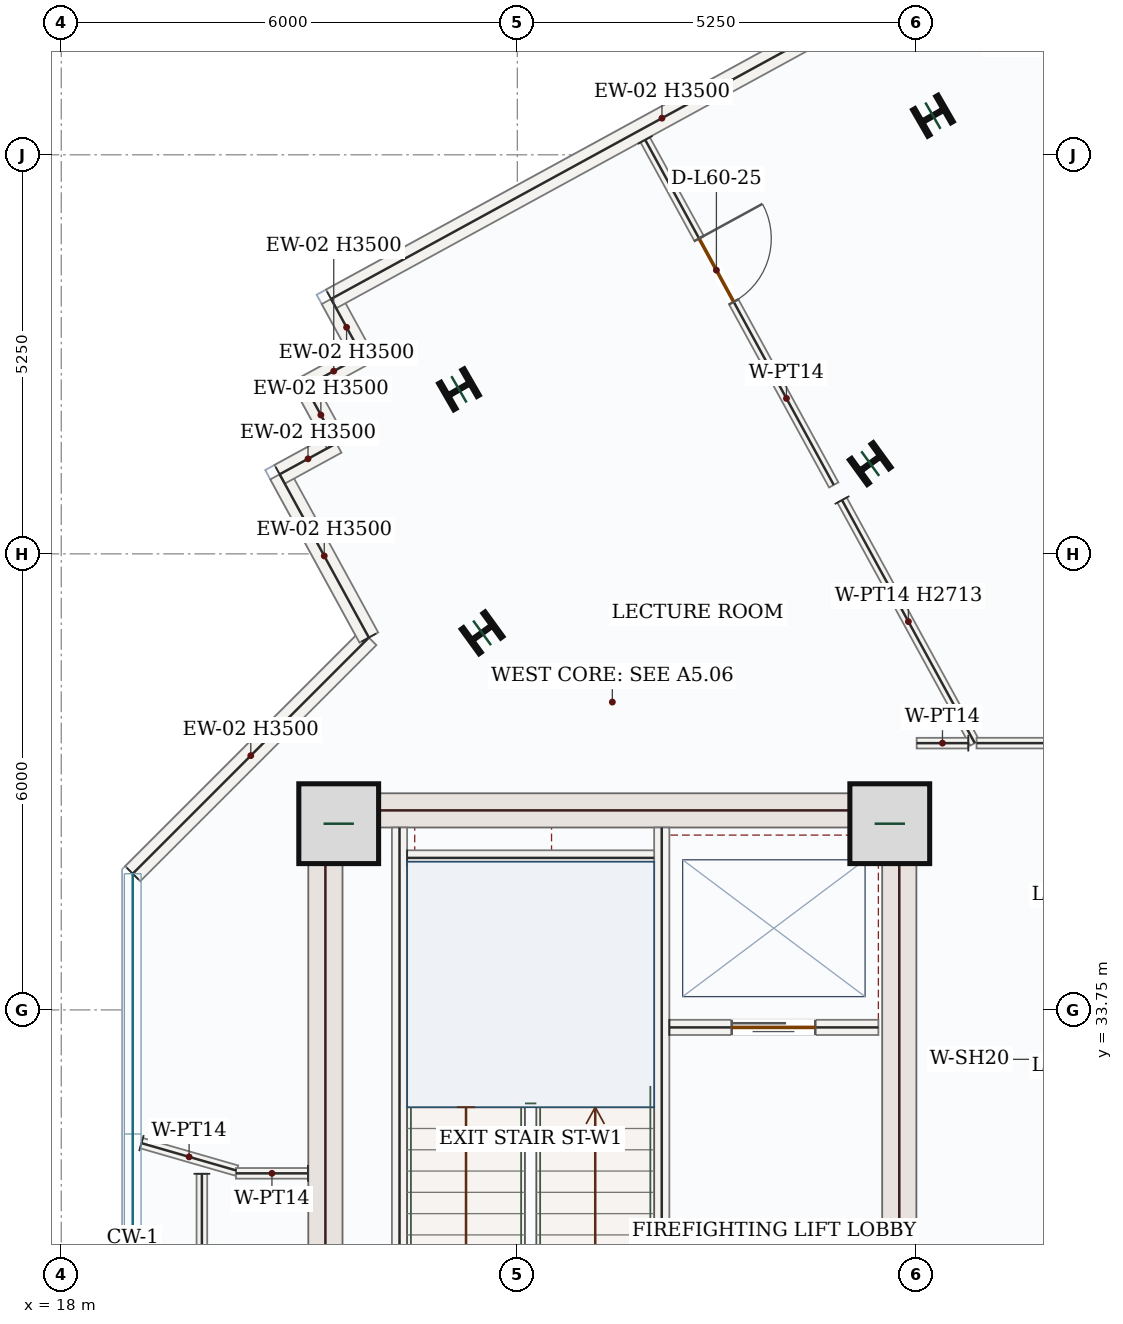
"""IFC4 building model, lengths in metres.
Left out: names, types, materials, properties, quantities, classifications, styles, units other than length and angle.
Written with IfcOpenShell. Run it as: python <this file> out.ifc"""

import sys

from ifc_helpers import new_model, si_unit, direction, frame, frame_2d, origin, origin_2d, place, context, subcontext, project, spatial, rectangle, i_section, extrude, source, transform, mapped, element, fill, save


model = new_model("IFC4")
c1 = context("Model", 3, precision=1e-05, world=origin(), true_north=direction((0.0, 1.0)))
c2 = subcontext(c1, "Body", "Model", "MODEL_VIEW")
j1 = project(units=[si_unit("LENGTHUNIT", "METRE"), si_unit("PLANEANGLEUNIT", "RADIAN")], contexts=[c1])
p1 = place(None, origin())
s1 = spatial("IfcSite", under=j1, at=p1, CompositionType="ELEMENT")
p2 = place(p1, origin())
s2 = spatial("IfcBuilding", under=s1, at=p2, CompositionType="ELEMENT")
p3 = place(p2, frame((0.0, 0.0, 254.1)))
s3 = spatial("IfcBuildingStorey", under=s2, at=p3, CompositionType="ELEMENT", Elevation=254.1)
m1 = source(origin(), c2, "Body", "SweptSolid", [
    extrude(rectangle(XDim=8.55, YDim=0.45, at=frame_2d((4.275, 0.0))), origin(), (0.0, 0.0, 1.0), 3.5),
])
p4 = place(p3, frame((21.475, 28.05, 0.0), z_axis=(0.0, 0.0, 1.0), x_axis=(0.0, 1.0, 0.0)))
e1 = element("IfcWall", 1, at=p4, inside=s3, PredefinedType="SHEAR", context=c2, shape_type="MappedRepresentation", body=[
    mapped(m1, transform((0.0, 0.0, 0.0), x_axis=(1.0, 0.0, 0.0), y_axis=(0.0, 1.0, 0.0), z_axis=(0.0, 0.0, 1.0), scale=1.0)),
])
p5 = place(p3, frame((29.025, 28.05, 0.0), z_axis=(0.0, 0.0, 1.0), x_axis=(0.0, 1.0, 0.0)))
e2 = element("IfcWall", 2, at=p5, inside=s3, PredefinedType="SHEAR", context=c2, shape_type="SweptSolid", body=[
    extrude(rectangle(XDim=8.55, YDim=0.45, at=frame_2d((4.275, 0.0))), origin(), (0.0, 0.0, 1.0), 3.5),
])
p6 = place(p5, frame((1.5, 0.0, 0.0)))
e3 = element("IfcOpeningElement", 3, at=p6, cuts=e2, PredefinedType="OPENING", context=c2, shape_type="SweptSolid", body=[
    extrude(rectangle(XDim=1.1, YDim=2.2, at=frame_2d((0.55, 1.1))), frame((0.0, 0.235, 0.0), z_axis=(0.0, -1.0, 0.0), x_axis=(1.0, 0.0, 0.0)), (0.0, 0.0, 1.0), 0.47),
])
m2 = source(origin(), c2, "Body", "SweptSolid", [
    extrude(rectangle(XDim=7.1, YDim=0.45, at=frame_2d((3.55, 0.0))), origin(), (0.0, 0.0, 1.0), 3.5),
])
p7 = place(p3, frame((21.7, 36.375, 0.0), z_axis=(0.0, 0.0, 1.0), x_axis=(1.0, 0.0, 0.0)))
e4 = element("IfcWall", 4, at=p7, inside=s3, PredefinedType="SHEAR", context=c2, shape_type="MappedRepresentation", body=[
    mapped(m2, transform((0.0, 0.0, 0.0), x_axis=(1.0, 0.0, 0.0), y_axis=(0.0, 1.0, 0.0), z_axis=(0.0, 0.0, 1.0), scale=1.0)),
])
m3 = source(origin(), c2, "Body", "SweptSolid", [
    extrude(rectangle(XDim=1.05, YDim=1.05, at=origin_2d()), origin(), (0.0, 0.0, 1.0), 3.75),
])
for number, where, z_axis, x_axis in (
    (5, (21.65, 36.2, 0.0), (0.0, 0.0, 1.0), (1.0, 0.0, 0.0)),
    (6, (28.9, 36.2, 0.0), (0.0, 0.0, 1.0), (1.0, 0.0, 0.0)),
):
    element("IfcColumn", number, at=place(p3, frame(where, z_axis=z_axis, x_axis=x_axis)), inside=s3, PredefinedType="COLUMN", context=c2, shape_type="MappedRepresentation", body=[
        mapped(m3, transform((0.0, 0.0, 0.0), x_axis=(1.0, 0.0, 0.0), y_axis=(0.0, 1.0, 0.0), z_axis=(0.0, 0.0, 1.0), scale=1.0)),
    ])
m4 = source(origin(), c2, "Body", "SweptSolid", [
    extrude(i_section(OverallWidth=0.399, OverallDepth=0.386, WebThickness=0.021, FlangeThickness=0.033, FilletRadius=0.018, at=origin_2d()), origin(), (0.0, 0.0, 1.0), 3.75),
])
for number, where, z_axis, x_axis in (
    (7, (28.643, 40.937, 0.0), (0.0, 0.0, 1.0), (-0.588, 0.809, 0.0)),
    (8, (23.536, 38.711, 0.0), (0.0, 0.0, 1.0), (-0.588, 0.809, 0.0)),
    (9, (29.468, 45.514, 0.0), (0.0, 0.0, 1.0), (-0.5, 0.866, 0.0)),
    (10, (23.232, 41.914, 0.0), (0.0, 0.0, 1.0), (-0.5, 0.866, 0.0)),
):
    element("IfcColumn", number, at=place(p3, frame(where, z_axis=z_axis, x_axis=x_axis)), inside=s3, PredefinedType="COLUMN", context=c2, shape_type="MappedRepresentation", body=[
        mapped(m4, transform((0.0, 0.0, 0.0), x_axis=(1.0, 0.0, 0.0), y_axis=(0.0, 1.0, 0.0), z_axis=(0.0, 0.0, 1.0), scale=1.0)),
    ])
m5 = source(origin(), c2, "Body", "SweptSolid", [
    extrude(rectangle(XDim=4.394, YDim=0.28, at=frame_2d((2.197, 0.0))), origin(), (0.0, 0.0, 1.0), 3.5),
])
p8 = place(p3, frame((18.94, 35.542, 0.0), z_axis=(0.0, 0.0, 1.0), x_axis=(0.707106781187, 0.707106781187, 0.0)))
e11 = element("IfcWall", 11, at=p8, inside=s3, PredefinedType="SOLIDWALL", context=c2, shape_type="MappedRepresentation", body=[
    mapped(m5, transform((0.0, 0.0, 0.0), x_axis=(1.0, 0.0, 0.0), y_axis=(0.0, 1.0, 0.0), z_axis=(0.0, 0.0, 1.0), scale=1.0)),
])
m6 = source(origin(), c2, "Body", "SweptSolid", [
    extrude(rectangle(XDim=2.448, YDim=0.28, at=frame_2d((1.224, 0.0))), origin(), (0.0, 0.0, 1.0), 3.5),
])
p9 = place(p3, frame((22.047, 38.649, 0.0), z_axis=(0.0, 0.0, 1.0), x_axis=(-0.47951595933, 0.877533158774, 0.0)))
e12 = element("IfcWall", 12, at=p9, inside=s3, PredefinedType="SOLIDWALL", context=c2, shape_type="MappedRepresentation", body=[
    mapped(m6, transform((0.0, 0.0, 0.0), x_axis=(1.0, 0.0, 0.0), y_axis=(0.0, 1.0, 0.0), z_axis=(0.0, 0.0, 1.0), scale=1.0)),
])
m7 = source(origin(), c2, "Body", "SweptSolid", [
    extrude(rectangle(XDim=0.85, YDim=0.28, at=frame_2d((0.425, 0.0))), origin(), (0.0, 0.0, 1.0), 3.5),
])
p10 = place(p3, frame((20.873, 40.796, 0.0), z_axis=(0.0, 0.0, 1.0), x_axis=(0.87752219781, 0.479536017782, 0.0)))
e13 = element("IfcWall", 13, at=p10, inside=s3, PredefinedType="SOLIDWALL", context=c2, shape_type="MappedRepresentation", body=[
    mapped(m7, transform((0.0, 0.0, 0.0), x_axis=(1.0, 0.0, 0.0), y_axis=(0.0, 1.0, 0.0), z_axis=(0.0, 0.0, 1.0), scale=1.0)),
])
m8 = source(origin(), c2, "Body", "SweptSolid", [
    extrude(rectangle(XDim=0.85, YDim=0.28, at=frame_2d((0.425, 0.0))), origin(), (0.0, 0.0, 1.0), 3.5),
])
for number, where, z_axis, x_axis in (
    (14, (21.619, 41.204, 0.0), (0.0, 0.0, 1.0), (-0.48, 0.877, 0.0)),
    (15, (21.211, 41.95, 0.0), (0.0, 0.0, 1.0), (0.878, 0.479, 0.0)),
):
    element("IfcWall", number, at=place(p3, frame(where, z_axis=z_axis, x_axis=x_axis)), inside=s3, PredefinedType="SOLIDWALL", context=c2, shape_type="MappedRepresentation", body=[
        mapped(m8, transform((0.0, 0.0, 0.0), x_axis=(1.0, 0.0, 0.0), y_axis=(0.0, 1.0, 0.0), z_axis=(0.0, 0.0, 1.0), scale=1.0)),
    ])
p11 = place(p3, frame((21.958, 42.357, 0.0), z_axis=(0.0, 0.0, 1.0), x_axis=(-0.479536017782, 0.87752219781, 0.0)))
e16 = element("IfcWall", 16, at=p11, inside=s3, PredefinedType="SOLIDWALL", context=c2, shape_type="MappedRepresentation", body=[
    mapped(m7, transform((0.0, 0.0, 0.0), x_axis=(1.0, 0.0, 0.0), y_axis=(0.0, 1.0, 0.0), z_axis=(0.0, 0.0, 1.0), scale=1.0)),
])
m9 = source(origin(), c2, "Body", "SweptSolid", [
    extrude(rectangle(XDim=9.92, YDim=0.28, at=frame_2d((4.96, 0.0))), origin(), (0.0, 0.0, 1.0), 3.5),
])
p12 = place(p3, frame((21.55, 43.104, 0.0), z_axis=(0.0, 0.0, 1.0), x_axis=(0.877572768104, 0.479443465574, 0.0)))
e17 = element("IfcWall", 17, at=p12, inside=s3, PredefinedType="SOLIDWALL", context=c2, shape_type="MappedRepresentation", body=[
    mapped(m9, transform((0.0, 0.0, 0.0), x_axis=(1.0, 0.0, 0.0), y_axis=(0.0, 1.0, 0.0), z_axis=(0.0, 0.0, 1.0), scale=1.0)),
])
m10 = source(origin(), c2, "Body", "SweptSolid", [
    extrude(rectangle(XDim=7.87, YDim=0.2, at=frame_2d((3.935, 0.0))), origin(), (0.0, 0.0, 1.0), 3.5),
])
p13 = place(p3, frame((22.45, 28.28, 0.0), z_axis=(0.0, 0.0, 1.0), x_axis=(0.0, 1.0, 0.0)))
e18 = element("IfcWall", 18, at=p13, inside=s3, PredefinedType="SOLIDWALL", context=c2, shape_type="MappedRepresentation", body=[
    mapped(m10, transform((0.0, 0.0, 0.0), x_axis=(1.0, 0.0, 0.0), y_axis=(0.0, 1.0, 0.0), z_axis=(0.0, 0.0, 1.0), scale=1.0)),
])
p14 = place(p3, frame((25.9, 28.15, 0.0), z_axis=(0.0, 0.0, 1.0), x_axis=(0.0, 1.0, 0.0)))
e19 = element("IfcWall", 19, at=p14, inside=s3, PredefinedType="SOLIDWALL", context=c2, shape_type="SweptSolid", body=[
    extrude(rectangle(XDim=8.0, YDim=0.2, at=frame_2d((4.0, 0.0))), origin(), (0.0, 0.0, 1.0), 3.5),
])
p15 = place(p14, frame((0.4, 0.0, 0.0)))
e20 = element("IfcOpeningElement", 20, at=p15, cuts=e19, PredefinedType="OPENING", context=c2, shape_type="SweptSolid", body=[
    extrude(rectangle(XDim=1.05, YDim=2.15, at=frame_2d((0.525, 1.075))), frame((0.0, 0.11, 0.0), z_axis=(0.0, -1.0, 0.0), x_axis=(1.0, 0.0, 0.0)), (0.0, 0.0, 1.0), 0.22),
])
m11 = source(origin(), c2, "Body", "SweptSolid", [
    extrude(rectangle(XDim=3.25, YDim=0.2, at=frame_2d((1.625, 0.0))), origin(), (0.0, 0.0, 1.0), 3.5),
])
p16 = place(p3, frame((22.55, 35.75, 0.0), z_axis=(0.0, 0.0, 1.0), x_axis=(1.0, 0.0, 0.0)))
e21 = element("IfcWall", 21, at=p16, inside=s3, PredefinedType="SOLIDWALL", context=c2, shape_type="MappedRepresentation", body=[
    mapped(m11, transform((0.0, 0.0, 0.0), x_axis=(1.0, 0.0, 0.0), y_axis=(0.0, 1.0, 0.0), z_axis=(0.0, 0.0, 1.0), scale=1.0)),
])
p17 = place(p3, frame((26.0, 33.52, 0.0), z_axis=(0.0, 0.0, 1.0), x_axis=(1.0, 0.0, 0.0)))
e22 = element("IfcWall", 22, at=p17, inside=s3, PredefinedType="SOLIDWALL", context=c2, shape_type="SweptSolid", body=[
    extrude(rectangle(XDim=2.75, YDim=0.2, at=frame_2d((1.375, 0.0))), origin(), (0.0, 0.0, 1.0), 3.5),
])
p18 = place(p17, frame((0.82, 0.0, 0.0)))
e23 = element("IfcOpeningElement", 23, at=p18, cuts=e22, PredefinedType="OPENING", context=c2, shape_type="SweptSolid", body=[
    extrude(rectangle(XDim=1.1, YDim=2.15, at=frame_2d((0.55, 1.075))), frame((0.0, 0.11, 0.0), z_axis=(0.0, -1.0, 0.0), x_axis=(1.0, 0.0, 0.0)), (0.0, 0.0, 1.0), 0.22),
])
m12 = source(origin(), c2, "Body", "SweptSolid", [
    extrude(rectangle(XDim=1.305, YDim=0.14, at=frame_2d((0.652, 0.0))), origin(), (0.0, 0.0, 1.0), 3.5),
])
p19 = place(p3, frame((19.055, 31.998, 0.0), z_axis=(0.0, 0.0, 1.0), x_axis=(0.960836047515, -0.2771174657, 0.0)))
e24 = element("IfcWall", 24, at=p19, inside=s3, PredefinedType="PARTITIONING", context=c2, shape_type="MappedRepresentation", body=[
    mapped(m12, transform((0.0, 0.0, 0.0), x_axis=(1.0, 0.0, 0.0), y_axis=(0.0, 1.0, 0.0), z_axis=(0.0, 0.0, 1.0), scale=1.0)),
])
p20 = place(p3, frame((19.85, 31.594, 0.0), z_axis=(0.0, 0.0, 1.0), x_axis=(2.657666e-05, -0.999999999647, 0.0)))
e25 = element("IfcWall", 25, at=p20, inside=s3, PredefinedType="PARTITIONING", context=c2, shape_type="SweptSolid", body=[
    extrude(rectangle(XDim=9.186, YDim=0.14, at=frame_2d((4.593, 0.0))), origin(), (0.0, 0.0, 1.0), 3.5),
])
p21 = place(p20, frame((2.883, 0.0, 0.0)))
e26 = element("IfcOpeningElement", 26, at=p21, cuts=e25, PredefinedType="OPENING", context=c2, shape_type="SweptSolid", body=[
    extrude(rectangle(XDim=0.95, YDim=2.15, at=frame_2d((0.475, 1.075))), frame((0.0, 0.08, 0.0), z_axis=(0.0, -1.0, 0.0), x_axis=(1.0, 0.0, 0.0)), (0.0, 0.0, 1.0), 0.16),
])
p22 = place(p3, frame((25.683, 45.196, 0.0), z_axis=(0.0, 0.0, 1.0), x_axis=(0.479427410708, -0.877581539153, 0.0)))
e27 = element("IfcWall", 27, at=p22, inside=s3, PredefinedType="PARTITIONING", context=c2, shape_type="SweptSolid", body=[
    extrude(rectangle(XDim=5.173, YDim=0.14, at=frame_2d((2.586, 0.0))), origin(), (0.0, 0.0, 1.0), 3.5),
])
p23 = place(p22, frame((1.478, 0.0, 0.0)))
e28 = element("IfcOpeningElement", 28, at=p23, cuts=e27, PredefinedType="OPENING", context=c2, shape_type="SweptSolid", body=[
    extrude(rectangle(XDim=0.95, YDim=2.15, at=frame_2d((0.475, 1.075))), frame((0.0, 0.08, 0.0), z_axis=(0.0, -1.0, 0.0), x_axis=(1.0, 0.0, 0.0)), (0.0, 0.0, 1.0), 0.16),
])
m13 = source(origin(), c2, "Body", "SweptSolid", [
    extrude(rectangle(XDim=3.644, YDim=0.14, at=frame_2d((1.822, 0.0))), origin(), (0.0, 0.0, 1.0), 2.713),
])
p24 = place(p3, frame((28.271, 40.457, 0.0), z_axis=(0.0, 0.0, 1.0), x_axis=(0.479509272429, -0.877536812706, 0.0)))
e29 = element("IfcWall", 29, at=p24, inside=s3, PredefinedType="PARTITIONING", context=c2, shape_type="MappedRepresentation", body=[
    mapped(m13, transform((0.0, 0.0, 0.0), x_axis=(1.0, 0.0, 0.0), y_axis=(0.0, 1.0, 0.0), z_axis=(0.0, 0.0, 1.0), scale=1.0)),
])
m14 = source(origin(), c2, "Body", "SweptSolid", [
    extrude(rectangle(XDim=0.68, YDim=0.14, at=frame_2d((0.34, 0.0))), origin(), (0.0, 0.0, 1.0), 3.5),
])
p25 = place(p3, frame((29.933, 37.26, 0.0), z_axis=(0.0, 0.0, 1.0), x_axis=(-0.999999741957, -0.000718390619, 0.0)))
e30 = element("IfcWall", 30, at=p25, inside=s3, PredefinedType="PARTITIONING", context=c2, shape_type="MappedRepresentation", body=[
    mapped(m14, transform((0.0, 0.0, 0.0), x_axis=(1.0, 0.0, 0.0), y_axis=(0.0, 1.0, 0.0), z_axis=(0.0, 0.0, 1.0), scale=1.0)),
])
m15 = source(origin(), c2, "Body", "SweptSolid", [
    extrude(rectangle(XDim=0.947, YDim=0.14, at=frame_2d((0.474, 0.0))), origin(), (0.0, 0.0, 1.0), 3.5),
])
p26 = place(p3, frame((21.245, 31.6, 0.0), z_axis=(0.0, 0.0, 1.0), x_axis=(-1.0, 0.0, 0.0)))
e31 = element("IfcWall", 31, at=p26, inside=s3, PredefinedType="PARTITIONING", context=c2, shape_type="MappedRepresentation", body=[
    mapped(m15, transform((0.0, 0.0, 0.0), x_axis=(1.0, 0.0, 0.0), y_axis=(0.0, 1.0, 0.0), z_axis=(0.0, 0.0, 1.0), scale=1.0)),
])
p27 = place(p3, frame((38.998, 37.26, 0.0), z_axis=(0.0, 0.0, 1.0), x_axis=(-1.0, 0.0, 0.0)))
e32 = element("IfcWall", 32, at=p27, inside=s3, PredefinedType="PARTITIONING", context=c2, shape_type="SweptSolid", body=[
    extrude(rectangle(XDim=8.956, YDim=0.14, at=frame_2d((4.478, 0.0))), origin(), (0.0, 0.0, 1.0), 3.5),
])
p28 = place(p27, frame((2.802, 0.0, 0.0)))
e33 = element("IfcOpeningElement", 33, at=p28, cuts=e32, PredefinedType="OPENING", context=c2, shape_type="SweptSolid", body=[
    extrude(rectangle(XDim=0.95, YDim=2.15, at=frame_2d((0.475, 1.075))), frame((0.0, 0.08, 0.0), z_axis=(0.0, -1.0, 0.0), x_axis=(1.0, 0.0, 0.0)), (0.0, 0.0, 1.0), 0.16),
])
m16 = source(origin(), c2, "Body", "SweptSolid", [
    extrude(rectangle(XDim=1.1, YDim=2.15, at=frame_2d((0.55, 1.075))), frame((0.0, 0.025, 0.0), z_axis=(0.0, -1.0, 0.0), x_axis=(1.0, 0.0, 0.0)), (0.0, 0.0, 1.0), 0.05),
])
p29 = place(p18, origin())
e34 = element("IfcDoor", 34, at=p29, inside=s3, OperationType="DOUBLE_DOOR_SLIDING", PredefinedType="DOOR", context=c2, shape_type="MappedRepresentation", body=[
    mapped(m16, transform((0.0, 0.0, 0.0), x_axis=(1.0, 0.0, 0.0), y_axis=(0.0, 1.0, 0.0), z_axis=(0.0, 0.0, 1.0), scale=1.0)),
])
fill(e23, e34)
m17 = source(origin(), c2, "Body", "SweptSolid", [
    extrude(rectangle(XDim=0.95, YDim=2.15, at=frame_2d((0.475, 1.075))), frame((0.0, 0.025, 0.0), z_axis=(0.0, -1.0, 0.0), x_axis=(1.0, 0.0, 0.0)), (0.0, 0.0, 1.0), 0.05),
])
p30 = place(p23, origin())
e35 = element("IfcDoor", 35, at=p30, inside=s3, OperationType="SINGLE_SWING_LEFT", PredefinedType="DOOR", context=c2, shape_type="MappedRepresentation", body=[
    mapped(m17, transform((0.0, 0.0, 0.0), x_axis=(1.0, 0.0, 0.0), y_axis=(0.0, 1.0, 0.0), z_axis=(0.0, 0.0, 1.0), scale=1.0)),
])
fill(e28, e35)
save(model, sys.argv[1])
